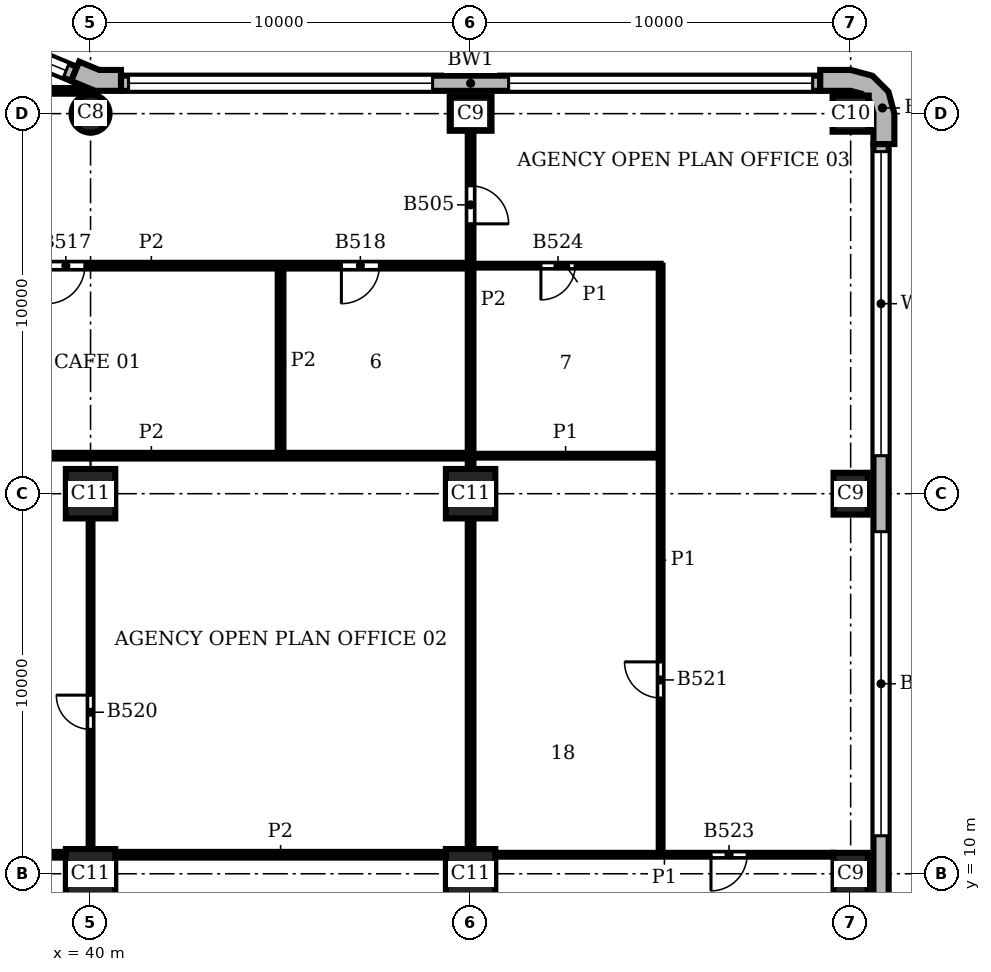
"""IFC4 building model, lengths in metres.
Left out: names, types, materials, properties, quantities, classifications, styles, units other than length and angle.
Written with IfcOpenShell. Run it as: python <this file> out.ifc"""

import sys

from ifc_helpers import new_model, si_unit, direction, frame, frame_2d, origin, origin_2d, place, context, subcontext, project, spatial, polyline, rectangle, circle, outline, extrude, element, fill, save


model = new_model("IFC4")
c1 = context("Model", 3, precision=1e-05, world=origin(), true_north=direction((0.0, 1.0)))
c2 = subcontext(c1, "Body", "Model", "MODEL_VIEW")
j1 = project(units=[si_unit("LENGTHUNIT", "METRE"), si_unit("PLANEANGLEUNIT", "RADIAN")], contexts=[c1])
p1 = place(None, origin())
s1 = spatial("IfcSite", under=j1, at=p1, CompositionType="ELEMENT")
p2 = place(p1, origin())
s2 = spatial("IfcBuilding", under=s1, at=p2, CompositionType="ELEMENT")
p3 = place(p2, frame((0.0, 0.0, 178.5)))
s3 = spatial("IfcBuildingStorey", under=s2, at=p3, CompositionType="ELEMENT", Elevation=178.5)
for number, where, z_axis, x_axis in (
    (1, (60.0, 10.0, 0.0), (0.0, 0.0, 1.0), (0.0, 1.0, 0.0)),
    (2, (60.0, 20.0, 0.0), (0.0, 0.0, 1.0), (0.0, 1.0, 0.0)),
):
    element("IfcColumn", number, at=place(p3, frame(where, z_axis=z_axis, x_axis=x_axis)), inside=s3, PredefinedType="COLUMN", context=c2, shape_type="SweptSolid", body=[
        extrude(rectangle(XDim=1.1, YDim=0.9, at=origin_2d()), origin(), (0.0, 0.0, 1.0), 3.9),
    ])
p4 = place(p3, frame((60.0, 30.0, 0.0), z_axis=(0.0, 0.0, 1.0), x_axis=(1.0, 0.0, 0.0)))
e3 = element("IfcColumn", 3, at=p4, inside=s3, PredefinedType="COLUMN", context=c2, shape_type="SweptSolid", body=[
    extrude(rectangle(XDim=0.95, YDim=0.95, at=origin_2d()), origin(), (0.0, 0.0, 1.0), 3.9),
])
p5 = place(p3, frame((50.0, 30.0, 0.0), z_axis=(0.0, 0.0, 1.0), x_axis=(1.0, 0.0, 0.0)))
e4 = element("IfcColumn", 4, at=p5, inside=s3, PredefinedType="COLUMN", context=c2, shape_type="SweptSolid", body=[
    extrude(rectangle(XDim=1.1, YDim=0.9, at=origin_2d()), origin(), (0.0, 0.0, 1.0), 3.9),
])
p6 = place(p3, frame((40.0, 30.0, 0.0), z_axis=(0.0, 0.0, 1.0), x_axis=(1.0, 0.0, 0.0)))
e5 = element("IfcColumn", 5, at=p6, inside=s3, PredefinedType="COLUMN", context=c2, shape_type="SweptSolid", body=[
    extrude(circle(Radius=0.5, at=origin_2d()), origin(), (0.0, 0.0, 1.0), 3.9),
])
for number, where, z_axis, x_axis in (
    (6, (40.0, 10.0, 0.0), (0.0, 0.0, 1.0), (1.0, 0.0, 0.0)),
    (7, (40.0, 20.0, 0.0), (0.0, 0.0, 1.0), (1.0, 0.0, 0.0)),
    (8, (50.0, 10.0, 0.0), (0.0, 0.0, 1.0), (1.0, 0.0, 0.0)),
    (9, (50.0, 20.0, 0.0), (0.0, 0.0, 1.0), (1.0, 0.0, 0.0)),
):
    element("IfcColumn", number, at=place(p3, frame(where, z_axis=z_axis, x_axis=x_axis)), inside=s3, PredefinedType="COLUMN", context=c2, shape_type="SweptSolid", body=[
        extrude(rectangle(XDim=1.3, YDim=1.3, at=origin_2d()), origin(), (0.0, 0.0, 1.0), 3.9),
    ])
p7 = place(p3, origin())
e10 = element("IfcWall", 10, at=p7, inside=s3, PredefinedType="SOLIDWALL", context=c2, shape_type="SweptSolid", body=[
    extrude(outline(polyline([(61.0, 29.2), (61.15, 29.2), (61.15, 30.0), (60.996, 30.575), (60.575, 30.996), (60.0, 31.15), (59.2, 31.15), (59.2, 31.0), (59.2, 30.6), (60.0, 30.6), (60.3, 30.52), (60.52, 30.3), (60.6, 30.0), (60.6, 29.2), (61.0, 29.2)])), origin(), (0.0, 0.0, 1.0), 3.9),
])
e11 = element("IfcWall", 11, at=p7, inside=s3, PredefinedType="SOLIDWALL", context=c2, shape_type="SweptSolid", body=[
    extrude(outline(polyline([(40.8, 31.0), (40.8, 31.15), (40.229, 31.15), (39.701, 31.369), (39.644, 31.23), (39.49, 30.861), (40.119, 30.6), (40.8, 30.6), (40.8, 31.0)])), origin(), (0.0, 0.0, 1.0), 3.9),
])
p8 = place(p3, frame((60.8, 0.8, 0.0), z_axis=(0.0, 0.0, 1.0), x_axis=(0.0, 1.0, 0.0)))
e12 = element("IfcWall", 12, at=p8, inside=s3, PredefinedType="SOLIDWALL", context=c2, shape_type="SweptSolid", body=[
    extrude(rectangle(XDim=28.4, YDim=0.4, at=frame_2d((14.2, 0.0))), origin(), (0.0, 0.0, 1.0), 3.9),
])
p9 = place(p8, frame((0.2, 0.0, 0.9)))
e13 = element("IfcOpeningElement", 13, at=p9, cuts=e12, PredefinedType="OPENING", context=c2, shape_type="SweptSolid", body=[
    extrude(rectangle(XDim=8.0, YDim=2.35, at=frame_2d((4.0, 1.175))), frame((0.0, 0.21, 0.0), z_axis=(0.0, -1.0, 0.0), x_axis=(1.0, 0.0, 0.0)), (0.0, 0.0, 1.0), 0.42),
])
p10 = place(p8, frame((10.2, 0.0, 0.9)))
e14 = element("IfcOpeningElement", 14, at=p10, cuts=e12, PredefinedType="OPENING", context=c2, shape_type="SweptSolid", body=[
    extrude(rectangle(XDim=8.0, YDim=2.35, at=frame_2d((4.0, 1.175))), frame((0.0, 0.21, 0.0), z_axis=(0.0, -1.0, 0.0), x_axis=(1.0, 0.0, 0.0)), (0.0, 0.0, 1.0), 0.42),
])
p11 = place(p8, frame((20.2, 0.0, 0.9)))
e15 = element("IfcOpeningElement", 15, at=p11, cuts=e12, PredefinedType="OPENING", context=c2, shape_type="SweptSolid", body=[
    extrude(rectangle(XDim=8.0, YDim=2.35, at=frame_2d((4.0, 1.175))), frame((0.0, 0.21, 0.0), z_axis=(0.0, -1.0, 0.0), x_axis=(1.0, 0.0, 0.0)), (0.0, 0.0, 1.0), 0.42),
])
p12 = place(p3, frame((59.2, 30.8, 0.0), z_axis=(0.0, 0.0, 1.0), x_axis=(-1.0, 0.0, 0.0)))
e16 = element("IfcWall", 16, at=p12, inside=s3, PredefinedType="SOLIDWALL", context=c2, shape_type="SweptSolid", body=[
    extrude(rectangle(XDim=18.4, YDim=0.4, at=frame_2d((9.2, 0.0))), origin(), (0.0, 0.0, 1.0), 3.9),
])
p13 = place(p12, frame((0.2, 0.0, 0.9)))
e17 = element("IfcOpeningElement", 17, at=p13, cuts=e16, PredefinedType="OPENING", context=c2, shape_type="SweptSolid", body=[
    extrude(rectangle(XDim=8.0, YDim=2.35, at=frame_2d((4.0, 1.175))), frame((0.0, 0.21, 0.0), z_axis=(0.0, -1.0, 0.0), x_axis=(1.0, 0.0, 0.0)), (0.0, 0.0, 1.0), 0.42),
])
p14 = place(p12, frame((10.2, 0.0, 0.9)))
e18 = element("IfcOpeningElement", 18, at=p14, cuts=e16, PredefinedType="OPENING", context=c2, shape_type="SweptSolid", body=[
    extrude(rectangle(XDim=8.0, YDim=2.35, at=frame_2d((4.0, 1.175))), frame((0.0, 0.21, 0.0), z_axis=(0.0, -1.0, 0.0), x_axis=(1.0, 0.0, 0.0)), (0.0, 0.0, 1.0), 0.42),
])
p15 = place(p3, frame((39.567, 31.045, 0.0), z_axis=(0.0, 0.0, 1.0), x_axis=(-0.923891000409, 0.382655745237, 0.0)))
e19 = element("IfcWall", 19, at=p15, inside=s3, PredefinedType="SOLIDWALL", context=c2, shape_type="SweptSolid", body=[
    extrude(rectangle(XDim=6.053, YDim=0.4, at=frame_2d((3.027, 0.0))), origin(), (0.0, 0.0, 1.0), 3.9),
])
p16 = place(p15, frame((0.227, 0.0, 0.9)))
e20 = element("IfcOpeningElement", 20, at=p16, cuts=e19, PredefinedType="OPENING", context=c2, shape_type="SweptSolid", body=[
    extrude(rectangle(XDim=5.6, YDim=2.35, at=frame_2d((2.8, 1.175))), frame((0.0, 0.21, 0.0), z_axis=(0.0, -1.0, 0.0), x_axis=(1.0, 0.0, 0.0)), (0.0, 0.0, 1.0), 0.42),
])
p17 = place(p3, frame((40.0, 10.65, 0.0), z_axis=(0.0, 0.0, 1.0), x_axis=(0.0, 1.0, 0.0)))
e21 = element("IfcWall", 21, at=p17, inside=s3, PredefinedType="PARTITIONING", context=c2, shape_type="SweptSolid", body=[
    extrude(rectangle(XDim=8.7, YDim=0.1, at=frame_2d((4.35, 0.0))), origin(), (0.0, 0.0, 1.0), 3.58),
])
p18 = place(p17, frame((3.15, 0.0, 0.0)))
e22 = element("IfcOpeningElement", 22, at=p18, cuts=e21, PredefinedType="OPENING", context=c2, shape_type="SweptSolid", body=[
    extrude(rectangle(XDim=0.9, YDim=2.1, at=frame_2d((0.45, 1.05))), frame((0.0, 0.06, 0.0), z_axis=(0.0, -1.0, 0.0), x_axis=(1.0, 0.0, 0.0)), (0.0, 0.0, 1.0), 0.12),
])
p19 = place(p3, frame((55.0, 10.5, 0.0), z_axis=(0.0, 0.0, 1.0), x_axis=(0.0, 1.0, 0.0)))
e23 = element("IfcWall", 23, at=p19, inside=s3, PredefinedType="PARTITIONING", context=c2, shape_type="SweptSolid", body=[
    extrude(rectangle(XDim=15.5, YDim=0.1, at=frame_2d((7.75, 0.0))), origin(), (0.0, 0.0, 1.0), 3.58),
])
p20 = place(p19, frame((4.125, 0.0, 0.0)))
e24 = element("IfcOpeningElement", 24, at=p20, cuts=e23, PredefinedType="OPENING", context=c2, shape_type="SweptSolid", body=[
    extrude(rectangle(XDim=0.95, YDim=2.1, at=frame_2d((0.475, 1.05))), frame((0.0, 0.06, 0.0), z_axis=(0.0, -1.0, 0.0), x_axis=(1.0, 0.0, 0.0)), (0.0, 0.0, 1.0), 0.12),
])
p21 = place(p3, frame((50.65, 10.5, 0.0), z_axis=(0.0, 0.0, 1.0), x_axis=(1.0, 0.0, 0.0)))
e25 = element("IfcWall", 25, at=p21, inside=s3, PredefinedType="PARTITIONING", context=c2, shape_type="SweptSolid", body=[
    extrude(rectangle(XDim=8.9, YDim=0.1, at=frame_2d((4.45, 0.0))), origin(), (0.0, 0.0, 1.0), 3.58),
])
p22 = place(p21, frame((5.675, 0.0, 0.0)))
e26 = element("IfcOpeningElement", 26, at=p22, cuts=e25, PredefinedType="OPENING", context=c2, shape_type="SweptSolid", body=[
    extrude(rectangle(XDim=0.95, YDim=2.1, at=frame_2d((0.475, 1.05))), frame((0.0, 0.06, 0.0), z_axis=(0.0, -1.0, 0.0), x_axis=(1.0, 0.0, 0.0)), (0.0, 0.0, 1.0), 0.12),
])
p23 = place(p3, frame((50.0, 21.0, 0.0), z_axis=(0.0, 0.0, 1.0), x_axis=(1.0, 0.0, 0.0)))
e27 = element("IfcWall", 27, at=p23, inside=s3, PredefinedType="PARTITIONING", context=c2, shape_type="SweptSolid", body=[
    extrude(rectangle(XDim=5.0, YDim=0.1, at=frame_2d((2.5, 0.0))), origin(), (0.0, 0.0, 1.0), 3.58),
])
p24 = place(p3, frame((50.0, 26.0, 0.0), z_axis=(0.0, 0.0, 1.0), x_axis=(1.0, 0.0, 0.0)))
e28 = element("IfcWall", 28, at=p24, inside=s3, PredefinedType="PARTITIONING", context=c2, shape_type="SweptSolid", body=[
    extrude(rectangle(XDim=5.0, YDim=0.1, at=frame_2d((2.5, 0.0))), origin(), (0.0, 0.0, 1.0), 3.58),
])
p25 = place(p24, frame((1.85, 0.0, 0.0)))
e29 = element("IfcOpeningElement", 29, at=p25, cuts=e28, PredefinedType="OPENING", context=c2, shape_type="SweptSolid", body=[
    extrude(rectangle(XDim=0.9, YDim=2.1, at=frame_2d((0.45, 1.05))), frame((0.0, 0.06, 0.0), z_axis=(0.0, -1.0, 0.0), x_axis=(1.0, 0.0, 0.0)), (0.0, 0.0, 1.0), 0.12),
])
p26 = place(p3, frame((45.0, 21.0, 0.0), z_axis=(0.0, 0.0, 1.0), x_axis=(0.0, 1.0, 0.0)))
e30 = element("IfcWall", 30, at=p26, inside=s3, PredefinedType="PARTITIONING", context=c2, shape_type="SweptSolid", body=[
    extrude(rectangle(XDim=5.0, YDim=0.15, at=frame_2d((2.5, 0.0))), origin(), (0.0, 0.0, 1.0), 3.58),
])
p27 = place(p3, frame((50.0, 10.65, 0.0), z_axis=(0.0, 0.0, 1.0), x_axis=(0.0, 1.0, 0.0)))
e31 = element("IfcWall", 31, at=p27, inside=s3, PredefinedType="PARTITIONING", context=c2, shape_type="SweptSolid", body=[
    extrude(rectangle(XDim=8.7, YDim=0.15, at=frame_2d((4.35, 0.0))), origin(), (0.0, 0.0, 1.0), 3.58),
])
p28 = place(p3, frame((50.0, 20.65, 0.0), z_axis=(0.0, 0.0, 1.0), x_axis=(0.0, 1.0, 0.0)))
e32 = element("IfcWall", 32, at=p28, inside=s3, PredefinedType="PARTITIONING", context=c2, shape_type="SweptSolid", body=[
    extrude(rectangle(XDim=8.9, YDim=0.15, at=frame_2d((4.45, 0.0))), origin(), (0.0, 0.0, 1.0), 3.58),
])
p29 = place(p28, frame((6.45, 0.0, 0.0)))
e33 = element("IfcOpeningElement", 33, at=p29, cuts=e32, PredefinedType="OPENING", context=c2, shape_type="SweptSolid", body=[
    extrude(rectangle(XDim=1.0, YDim=2.1, at=frame_2d((0.5, 1.05))), frame((0.0, 0.085, 0.0), z_axis=(0.0, -1.0, 0.0), x_axis=(1.0, 0.0, 0.0)), (0.0, 0.0, 1.0), 0.17),
])
p30 = place(p3, frame((33.201, 10.5, 0.0), z_axis=(0.0, 0.0, 1.0), x_axis=(1.0, 0.0, 0.0)))
e34 = element("IfcWall", 34, at=p30, inside=s3, PredefinedType="PARTITIONING", context=c2, shape_type="SweptSolid", body=[
    extrude(rectangle(XDim=6.149, YDim=0.15, at=frame_2d((3.075, 0.0))), origin(), (0.0, 0.0, 1.0), 3.58),
])
p31 = place(p3, frame((40.65, 10.5, 0.0), z_axis=(0.0, 0.0, 1.0), x_axis=(1.0, 0.0, 0.0)))
e35 = element("IfcWall", 35, at=p31, inside=s3, PredefinedType="PARTITIONING", context=c2, shape_type="SweptSolid", body=[
    extrude(rectangle(XDim=8.7, YDim=0.15, at=frame_2d((4.35, 0.0))), origin(), (0.0, 0.0, 1.0), 3.58),
])
p32 = place(p3, frame((33.2, 21.0, 0.0), z_axis=(0.0, 0.0, 1.0), x_axis=(1.0, 0.0, 0.0)))
e36 = element("IfcWall", 36, at=p32, inside=s3, PredefinedType="PARTITIONING", context=c2, shape_type="SweptSolid", body=[
    extrude(rectangle(XDim=16.8, YDim=0.15, at=frame_2d((8.4, 0.0))), origin(), (0.0, 0.0, 1.0), 3.58),
])
p33 = place(p3, frame((33.2, 26.0, 0.0), z_axis=(0.0, 0.0, 1.0), x_axis=(1.0, 0.0, 0.0)))
e37 = element("IfcWall", 37, at=p33, inside=s3, PredefinedType="PARTITIONING", context=c2, shape_type="SweptSolid", body=[
    extrude(rectangle(XDim=16.8, YDim=0.15, at=frame_2d((8.4, 0.0))), origin(), (0.0, 0.0, 1.0), 3.58),
])
p34 = place(p33, frame((5.65, 0.0, 0.0)))
e38 = element("IfcOpeningElement", 38, at=p34, cuts=e37, PredefinedType="OPENING", context=c2, shape_type="SweptSolid", body=[
    extrude(rectangle(XDim=1.0, YDim=2.1, at=frame_2d((0.5, 1.05))), frame((0.0, 0.085, 0.0), z_axis=(0.0, -1.0, 0.0), x_axis=(1.0, 0.0, 0.0)), (0.0, 0.0, 1.0), 0.17),
])
p35 = place(p33, frame((13.4, 0.0, 0.0)))
e39 = element("IfcOpeningElement", 39, at=p35, cuts=e37, PredefinedType="OPENING", context=c2, shape_type="SweptSolid", body=[
    extrude(rectangle(XDim=1.0, YDim=2.1, at=frame_2d((0.5, 1.05))), frame((0.0, 0.085, 0.0), z_axis=(0.0, -1.0, 0.0), x_axis=(1.0, 0.0, 0.0)), (0.0, 0.0, 1.0), 0.17),
])
p36 = place(p3, frame((30.65, 30.6, 0.0), z_axis=(0.0, 0.0, 1.0), x_axis=(1.0, 0.0, 0.0)))
e40 = element("IfcWall", 40, at=p36, inside=s3, PredefinedType="PARTITIONING", context=c2, shape_type="SweptSolid", body=[
    extrude(rectangle(XDim=9.288, YDim=0.15, at=frame_2d((4.644, 0.0))), origin(), (0.0, 0.0, 1.0), 3.58),
])
p37 = place(p10, origin())
e41 = element("IfcWindow", 41, at=p37, inside=s3, PartitioningType="SINGLE_PANEL", PredefinedType="WINDOW", context=c2, shape_type="SweptSolid", body=[
    extrude(rectangle(XDim=8.0, YDim=2.35, at=frame_2d((4.0, 1.175))), frame((0.0, 0.16, 0.0), z_axis=(0.0, -1.0, 0.0), x_axis=(1.0, 0.0, 0.0)), (0.0, 0.0, 1.0), 0.06),
])
fill(e14, e41)
p38 = place(p11, origin())
e42 = element("IfcWindow", 42, at=p38, inside=s3, PartitioningType="SINGLE_PANEL", PredefinedType="WINDOW", context=c2, shape_type="SweptSolid", body=[
    extrude(rectangle(XDim=8.0, YDim=2.35, at=frame_2d((4.0, 1.175))), frame((0.0, 0.16, 0.0), z_axis=(0.0, -1.0, 0.0), x_axis=(1.0, 0.0, 0.0)), (0.0, 0.0, 1.0), 0.06),
])
fill(e15, e42)
p39 = place(p13, origin())
e43 = element("IfcWindow", 43, at=p39, inside=s3, PartitioningType="SINGLE_PANEL", PredefinedType="WINDOW", context=c2, shape_type="SweptSolid", body=[
    extrude(rectangle(XDim=8.0, YDim=2.35, at=frame_2d((4.0, 1.175))), frame((0.0, 0.16, 0.0), z_axis=(0.0, -1.0, 0.0), x_axis=(1.0, 0.0, 0.0)), (0.0, 0.0, 1.0), 0.06),
])
fill(e17, e43)
p40 = place(p14, origin())
e44 = element("IfcWindow", 44, at=p40, inside=s3, PartitioningType="SINGLE_PANEL", PredefinedType="WINDOW", context=c2, shape_type="SweptSolid", body=[
    extrude(rectangle(XDim=8.0, YDim=2.35, at=frame_2d((4.0, 1.175))), frame((0.0, 0.16, 0.0), z_axis=(0.0, -1.0, 0.0), x_axis=(1.0, 0.0, 0.0)), (0.0, 0.0, 1.0), 0.06),
])
fill(e18, e44)
p41 = place(p16, origin())
e45 = element("IfcWindow", 45, at=p41, inside=s3, PartitioningType="SINGLE_PANEL", PredefinedType="WINDOW", context=c2, shape_type="SweptSolid", body=[
    extrude(rectangle(XDim=5.6, YDim=2.35, at=frame_2d((2.8, 1.175))), frame((0.0, 0.16, 0.0), z_axis=(0.0, -1.0, 0.0), x_axis=(1.0, 0.0, 0.0)), (0.0, 0.0, 1.0), 0.06),
])
fill(e20, e45)
p42 = place(p29, frame((1.0, 0.0, 0.0), z_axis=(0.0, 0.0, 1.0), x_axis=(-1.0, 0.0, 0.0)))
e46 = element("IfcDoor", 46, at=p42, inside=s3, OperationType="SINGLE_SWING_RIGHT", PredefinedType="DOOR", context=c2, shape_type="SweptSolid", body=[
    extrude(rectangle(XDim=1.0, YDim=2.1, at=frame_2d((0.5, 1.05))), frame((0.0, 0.025, 0.0), z_axis=(0.0, -1.0, 0.0), x_axis=(1.0, 0.0, 0.0)), (0.0, 0.0, 1.0), 0.05),
])
fill(e33, e46)
p43 = place(p34, frame((1.0, 0.0, 0.0), z_axis=(0.0, 0.0, 1.0), x_axis=(-1.0, 0.0, 0.0)))
e47 = element("IfcDoor", 47, at=p43, inside=s3, OperationType="SINGLE_SWING_RIGHT", PredefinedType="DOOR", context=c2, shape_type="SweptSolid", body=[
    extrude(rectangle(XDim=1.0, YDim=2.1, at=frame_2d((0.5, 1.05))), frame((0.0, 0.025, 0.0), z_axis=(0.0, -1.0, 0.0), x_axis=(1.0, 0.0, 0.0)), (0.0, 0.0, 1.0), 0.05),
])
fill(e38, e47)
p44 = place(p35, frame((1.0, 0.0, 0.0), z_axis=(0.0, 0.0, 1.0), x_axis=(-1.0, 0.0, 0.0)))
e48 = element("IfcDoor", 48, at=p44, inside=s3, OperationType="SINGLE_SWING_RIGHT", PredefinedType="DOOR", context=c2, shape_type="SweptSolid", body=[
    extrude(rectangle(XDim=1.0, YDim=2.1, at=frame_2d((0.5, 1.05))), frame((0.0, 0.025, 0.0), z_axis=(0.0, -1.0, 0.0), x_axis=(1.0, 0.0, 0.0)), (0.0, 0.0, 1.0), 0.05),
])
fill(e39, e48)
p45 = place(p18, origin())
e49 = element("IfcDoor", 49, at=p45, inside=s3, OperationType="SINGLE_SWING_RIGHT", PredefinedType="DOOR", context=c2, shape_type="SweptSolid", body=[
    extrude(rectangle(XDim=0.9, YDim=2.1, at=frame_2d((0.45, 1.05))), frame((0.0, 0.025, 0.0), z_axis=(0.0, -1.0, 0.0), x_axis=(1.0, 0.0, 0.0)), (0.0, 0.0, 1.0), 0.05),
])
fill(e22, e49)
p46 = place(p20, origin())
e50 = element("IfcDoor", 50, at=p46, inside=s3, OperationType="SINGLE_SWING_RIGHT", PredefinedType="DOOR", context=c2, shape_type="SweptSolid", body=[
    extrude(rectangle(XDim=0.95, YDim=2.1, at=frame_2d((0.475, 1.05))), frame((0.0, 0.025, 0.0), z_axis=(0.0, -1.0, 0.0), x_axis=(1.0, 0.0, 0.0)), (0.0, 0.0, 1.0), 0.05),
])
fill(e24, e50)
p47 = place(p22, frame((0.95, 0.0, 0.0), z_axis=(0.0, 0.0, 1.0), x_axis=(-1.0, 0.0, 0.0)))
e51 = element("IfcDoor", 51, at=p47, inside=s3, OperationType="SINGLE_SWING_RIGHT", PredefinedType="DOOR", context=c2, shape_type="SweptSolid", body=[
    extrude(rectangle(XDim=0.95, YDim=2.1, at=frame_2d((0.475, 1.05))), frame((0.0, 0.025, 0.0), z_axis=(0.0, -1.0, 0.0), x_axis=(1.0, 0.0, 0.0)), (0.0, 0.0, 1.0), 0.05),
])
fill(e26, e51)
p48 = place(p25, frame((0.9, 0.0, 0.0), z_axis=(0.0, 0.0, 1.0), x_axis=(-1.0, 0.0, 0.0)))
e52 = element("IfcDoor", 52, at=p48, inside=s3, OperationType="SINGLE_SWING_RIGHT", PredefinedType="DOOR", context=c2, shape_type="SweptSolid", body=[
    extrude(rectangle(XDim=0.9, YDim=2.1, at=frame_2d((0.45, 1.05))), frame((0.0, 0.025, 0.0), z_axis=(0.0, -1.0, 0.0), x_axis=(1.0, 0.0, 0.0)), (0.0, 0.0, 1.0), 0.05),
])
fill(e29, e52)
save(model, sys.argv[1])
